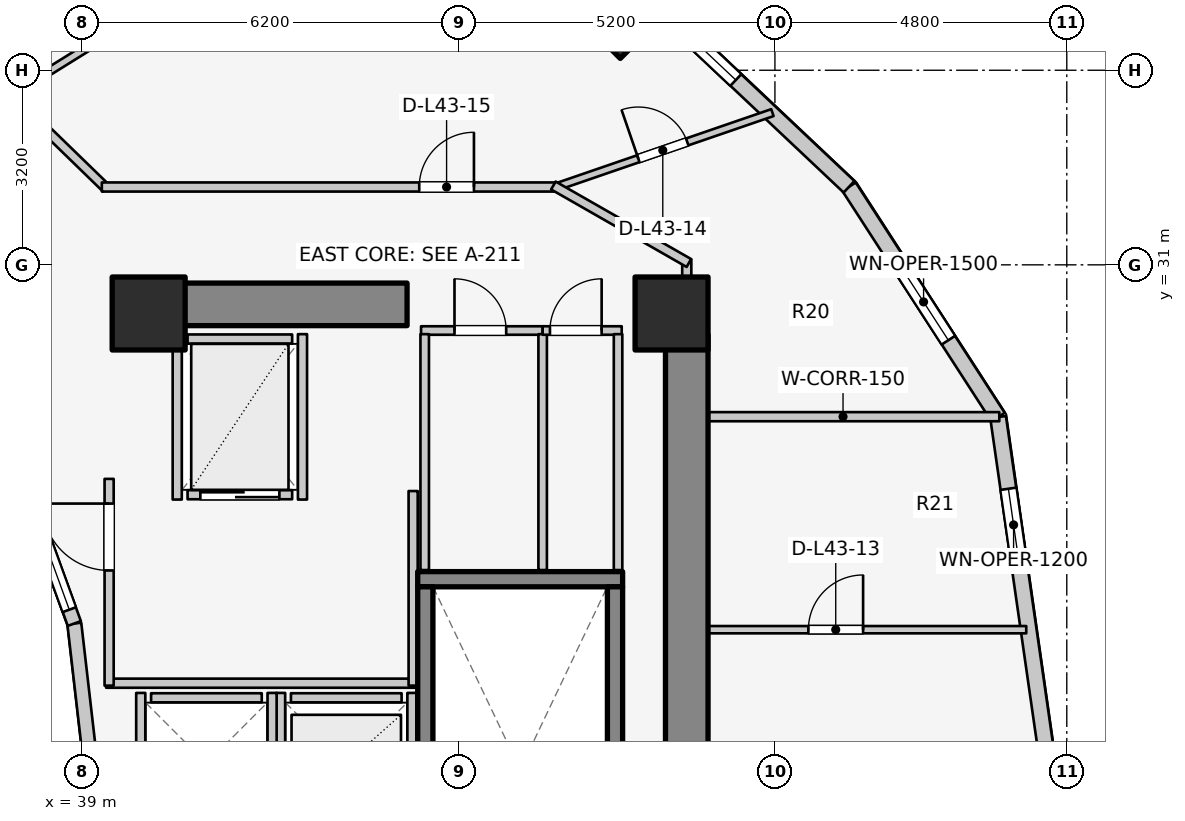
"""IFC4 building model, lengths in metres.
Left out: names, types, materials, properties, quantities, classifications, styles, units other than length and angle.
Written with IfcOpenShell. Run it as: python <this file> out.ifc"""

import sys

from ifc_helpers import new_model, si_unit, direction, frame, frame_2d, origin, origin_2d, place, context, subcontext, project, spatial, rectangle, extrude, element, fill, save


model = new_model("IFC4")
c1 = context("Model", 3, precision=1e-05, world=origin(), true_north=direction((0.0, 1.0)))
c2 = subcontext(c1, "Body", "Model", "MODEL_VIEW")
j1 = project(units=[si_unit("LENGTHUNIT", "METRE"), si_unit("PLANEANGLEUNIT", "RADIAN")], contexts=[c1])
p1 = place(None, origin())
s1 = spatial("IfcSite", under=j1, at=p1, CompositionType="ELEMENT")
p2 = place(p1, origin())
s2 = spatial("IfcBuilding", under=s1, at=p2, CompositionType="ELEMENT")
p3 = place(p2, frame((0.0, 0.0, 143.6)))
s3 = spatial("IfcBuildingStorey", under=s2, at=p3, CompositionType="ELEMENT", Elevation=143.6)
p4 = place(p3, frame((48.95, 17.05, 0.0), z_axis=(0.0, 0.0, 1.0), x_axis=(0.0, 1.0, 0.0)))
e1 = element("IfcWall", 1, at=p4, inside=s3, PredefinedType="SHEAR", context=c2, shape_type="SweptSolid", body=[
    extrude(rectangle(XDim=12.8, YDim=0.7, at=frame_2d((6.4, 0.0))), origin(), (0.0, 0.0, 1.0), 3.1),
])
p5 = place(p3, frame((39.85, 30.35, 0.0), z_axis=(0.0, 0.0, 1.0), x_axis=(1.0, 0.0, 0.0)))
e2 = element("IfcWall", 2, at=p5, inside=s3, PredefinedType="SHEAR", context=c2, shape_type="SweptSolid", body=[
    extrude(rectangle(XDim=4.5, YDim=0.7, at=frame_2d((2.25, 0.0))), origin(), (0.0, 0.0, 1.0), 3.1),
])
p6 = place(p3, frame((44.525, 25.83, 0.0), z_axis=(0.0, 0.0, 1.0), x_axis=(1.0, 0.0, 0.0)))
e3 = element("IfcWall", 3, at=p6, inside=s3, PredefinedType="SOLIDWALL", context=c2, shape_type="SweptSolid", body=[
    extrude(rectangle(XDim=3.37, YDim=0.25, at=frame_2d((1.685, 0.0))), origin(), (0.0, 0.0, 1.0), 3.1),
])
for number, where, z_axis, x_axis in (
    (4, (44.65, 17.895, 0.0), (0.0, 0.0, 1.0), (0.0, 1.0, 0.0)),
    (5, (47.77, 17.895, 0.0), (0.0, 0.0, 1.0), (0.0, 1.0, 0.0)),
):
    element("IfcWall", number, at=place(p3, frame(where, z_axis=z_axis, x_axis=x_axis)), inside=s3, PredefinedType="SOLIDWALL", context=c2, shape_type="SweptSolid", body=[
        extrude(rectangle(XDim=7.81, YDim=0.25, at=frame_2d((3.905, 0.0))), origin(), (0.0, 0.0, 1.0), 3.1),
    ])
for number, where, z_axis, x_axis in (
    (6, (48.7, 30.2, 0.0), (0.0, 0.0, 1.0), (1.0, 0.0, 0.0)),
    (7, (40.1, 30.2, 0.0), (0.0, 0.0, 1.0), (1.0, 0.0, 0.0)),
):
    element("IfcColumn", number, at=place(p3, frame(where, z_axis=z_axis, x_axis=x_axis)), inside=s3, PredefinedType="COLUMN", context=c2, shape_type="SweptSolid", body=[
        extrude(rectangle(XDim=1.2, YDim=1.2, at=origin_2d()), origin(), (0.0, 0.0, 1.0), 3.1),
    ])
p7 = place(p3, frame((47.857, 35.031, 0.0), z_axis=(0.0, 0.0, 1.0), x_axis=(0.707106781187, 0.707106781187, 0.0)))
e8 = element("IfcColumn", 8, at=p7, inside=s3, PredefinedType="COLUMN", context=c2, shape_type="SweptSolid", body=[
    extrude(rectangle(XDim=0.9, YDim=0.9, at=origin_2d()), origin(), (0.0, 0.0, 1.0), 3.1),
])
p8 = place(p3, frame((39.12, 23.0, 0.0), z_axis=(0.0, 0.0, 1.0), x_axis=(-0.114711713601, 0.993398823617, 0.0)))
e9 = element("IfcWall", 9, at=p8, inside=s3, PredefinedType="STANDARD", context=c2, shape_type="SweptSolid", body=[
    extrude(rectangle(XDim=2.115, YDim=0.23, at=frame_2d((1.058, 0.0))), origin(), (0.0, 0.0, 1.0), 2.84),
])
p9 = place(p3, frame((38.877, 25.102, 0.0), z_axis=(0.0, 0.0, 1.0), x_axis=(-0.341423187295, 0.93990968033, 0.0)))
e10 = element("IfcWall", 10, at=p9, inside=s3, PredefinedType="STANDARD", context=c2, shape_type="SweptSolid", body=[
    extrude(rectangle(XDim=2.084, YDim=0.23, at=frame_2d((1.042, 0.0))), origin(), (0.0, 0.0, 1.0), 2.84),
])
p10 = place(p9, frame((0.242, 0.0, 0.85)))
e11 = element("IfcOpeningElement", 11, at=p10, cuts=e10, PredefinedType="OPENING", context=c2, shape_type="SweptSolid", body=[
    extrude(rectangle(XDim=1.6, YDim=1.65, at=frame_2d((0.8, 0.825))), frame((0.0, 0.125, 0.0), z_axis=(0.0, -1.0, 0.0), x_axis=(1.0, 0.0, 0.0)), (0.0, 0.0, 1.0), 0.25),
])
p11 = place(p3, frame((54.86, 23.0, 0.0), z_axis=(0.0, 0.0, 1.0), x_axis=(-0.142227632286, 0.989833976288, 0.0)))
e12 = element("IfcWall", 12, at=p11, inside=s3, PredefinedType="STANDARD", context=c2, shape_type="SweptSolid", body=[
    extrude(rectangle(XDim=5.553, YDim=0.26, at=frame_2d((2.776, 0.0))), origin(), (0.0, 0.0, 1.0), 2.85),
])
p12 = place(p11, frame((3.162, 0.0, 0.75)))
e13 = element("IfcOpeningElement", 13, at=p12, cuts=e12, PredefinedType="OPENING", context=c2, shape_type="SweptSolid", body=[
    extrude(rectangle(XDim=1.2, YDim=1.5, at=frame_2d((0.6, 0.75))), frame((0.0, 0.14, 0.0), z_axis=(0.0, -1.0, 0.0), x_axis=(1.0, 0.0, 0.0)), (0.0, 0.0, 1.0), 0.28),
])
p13 = place(p3, frame((54.07, 28.497, 0.0), z_axis=(0.0, 0.0, 1.0), x_axis=(-0.543358984534, 0.839500454989, 0.0)))
e14 = element("IfcWall", 14, at=p13, inside=s3, PredefinedType="STANDARD", context=c2, shape_type="SweptSolid", body=[
    extrude(rectangle(XDim=4.511, YDim=0.26, at=frame_2d((2.256, 0.0))), origin(), (0.0, 0.0, 1.0), 2.85),
])
p14 = place(p13, frame((1.506, 0.0, 0.75)))
e15 = element("IfcOpeningElement", 15, at=p14, cuts=e14, PredefinedType="OPENING", context=c2, shape_type="SweptSolid", body=[
    extrude(rectangle(XDim=1.5, YDim=1.6, at=frame_2d((0.75, 0.8))), frame((0.0, 0.14, 0.0), z_axis=(0.0, -1.0, 0.0), x_axis=(1.0, 0.0, 0.0)), (0.0, 0.0, 1.0), 0.28),
])
p15 = place(p3, frame((51.619, 32.284, 0.0), z_axis=(0.0, 0.0, 1.0), x_axis=(-0.727667301037, 0.68593024354, 0.0)))
e16 = element("IfcWall", 16, at=p15, inside=s3, PredefinedType="STANDARD", context=c2, shape_type="SweptSolid", body=[
    extrude(rectangle(XDim=4.604, YDim=0.26, at=frame_2d((2.302, 0.0))), origin(), (0.0, 0.0, 1.0), 2.85),
])
p16 = place(p15, frame((2.56, 0.0, 0.75)))
e17 = element("IfcOpeningElement", 17, at=p16, cuts=e16, PredefinedType="OPENING", context=c2, shape_type="SweptSolid", body=[
    extrude(rectangle(XDim=1.2, YDim=1.5, at=frame_2d((0.6, 0.75))), frame((0.0, 0.14, 0.0), z_axis=(0.0, -1.0, 0.0), x_axis=(1.0, 0.0, 0.0)), (0.0, 0.0, 1.0), 0.28),
])
p17 = place(p3, frame((42.44, 23.88, 0.0), z_axis=(0.0, 0.0, 1.0), x_axis=(1.0, 0.0, 0.0)))
e18 = element("IfcWall", 18, at=p17, inside=s3, PredefinedType="SOLIDWALL", context=c2, shape_type="SweptSolid", body=[
    extrude(rectangle(XDim=1.82, YDim=0.15, at=frame_2d((0.91, 0.0))), origin(), (0.0, 0.0, 1.0), 2.855),
])
for number, where, z_axis, x_axis in (
    (19, (42.27, 21.64, 0.0), (0.0, 0.0, 1.0), (0.0, 1.0, 0.0)),
    (20, (44.43, 21.64, 0.0), (0.0, 0.0, 1.0), (0.0, 1.0, 0.0)),
):
    element("IfcWall", number, at=place(p3, frame(where, z_axis=z_axis, x_axis=x_axis)), inside=s3, PredefinedType="SOLIDWALL", context=c2, shape_type="SweptSolid", body=[
        extrude(rectangle(XDim=2.32, YDim=0.15, at=frame_2d((1.16, 0.0))), origin(), (0.0, 0.0, 1.0), 2.855),
    ])
p18 = place(p3, frame((40.14, 23.88, 0.0), z_axis=(0.0, 0.0, 1.0), x_axis=(1.0, 0.0, 0.0)))
e21 = element("IfcWall", 21, at=p18, inside=s3, PredefinedType="SOLIDWALL", context=c2, shape_type="SweptSolid", body=[
    extrude(rectangle(XDim=1.82, YDim=0.15, at=frame_2d((0.91, 0.0))), origin(), (0.0, 0.0, 1.0), 2.12),
])
p19 = place(p3, frame((39.97, 21.64, 0.0), z_axis=(0.0, 0.0, 1.0), x_axis=(0.0, 1.0, 0.0)))
e22 = element("IfcWall", 22, at=p19, inside=s3, PredefinedType="SOLIDWALL", context=c2, shape_type="SweptSolid", body=[
    extrude(rectangle(XDim=2.32, YDim=0.15, at=frame_2d((1.16, 0.0))), origin(), (0.0, 0.0, 1.0), 2.12),
])
p20 = place(p3, frame((42.13, 21.64, 0.0), z_axis=(0.0, 0.0, 1.0), x_axis=(0.0, 1.0, 0.0)))
e23 = element("IfcWall", 23, at=p20, inside=s3, PredefinedType="SOLIDWALL", context=c2, shape_type="SweptSolid", body=[
    extrude(rectangle(XDim=2.32, YDim=0.15, at=frame_2d((1.16, 0.0))), origin(), (0.0, 0.0, 1.0), 2.855),
])
p21 = place(p3, frame((40.74, 27.22, 0.0), z_axis=(0.0, 0.0, 1.0), x_axis=(1.0, 0.0, 0.0)))
e24 = element("IfcWall", 24, at=p21, inside=s3, PredefinedType="SOLIDWALL", context=c2, shape_type="SweptSolid", body=[
    extrude(rectangle(XDim=1.72, YDim=0.15, at=frame_2d((0.86, 0.0))), origin(), (0.0, 0.0, 1.0), 2.855),
])
p22 = place(p21, frame((0.21, 0.0, 0.0)))
e25 = element("IfcOpeningElement", 25, at=p22, cuts=e24, PredefinedType="OPENING", context=c2, shape_type="SweptSolid", body=[
    extrude(rectangle(XDim=1.3, YDim=2.1, at=frame_2d((0.65, 1.05))), frame((0.0, 0.085, 0.0), z_axis=(0.0, -1.0, 0.0), x_axis=(1.0, 0.0, 0.0)), (0.0, 0.0, 1.0), 0.17),
])
p23 = place(p3, frame((40.74, 29.78, 0.0), z_axis=(0.0, 0.0, 1.0), x_axis=(1.0, 0.0, 0.0)))
e26 = element("IfcWall", 26, at=p23, inside=s3, PredefinedType="SOLIDWALL", context=c2, shape_type="SweptSolid", body=[
    extrude(rectangle(XDim=1.72, YDim=0.15, at=frame_2d((0.86, 0.0))), origin(), (0.0, 0.0, 1.0), 2.855),
])
for number, where, z_axis, x_axis in (
    (27, (40.57, 27.14, 0.0), (0.0, 0.0, 1.0), (0.0, 1.0, 0.0)),
    (28, (42.63, 27.14, 0.0), (0.0, 0.0, 1.0), (0.0, 1.0, 0.0)),
):
    element("IfcWall", number, at=place(p3, frame(where, z_axis=z_axis, x_axis=x_axis)), inside=s3, PredefinedType="SOLIDWALL", context=c2, shape_type="SweptSolid", body=[
        extrude(rectangle(XDim=2.72, YDim=0.15, at=frame_2d((1.36, 0.0))), origin(), (0.0, 0.0, 1.0), 2.855),
    ])
p24 = place(p3, frame((39.4, 24.12, 0.0), z_axis=(0.0, 0.0, 1.0), x_axis=(1.0, 0.0, 0.0)))
e29 = element("IfcWall", 29, at=p24, inside=s3, PredefinedType="PARTITIONING", context=c2, shape_type="SweptSolid", body=[
    extrude(rectangle(XDim=5.08, YDim=0.15, at=frame_2d((2.54, 0.0))), origin(), (0.0, 0.0, 1.0), 2.12),
])
p25 = place(p3, frame((44.45, 24.08, 0.0), z_axis=(0.0, 0.0, 1.0), x_axis=(0.0, 1.0, 0.0)))
e30 = element("IfcWall", 30, at=p25, inside=s3, PredefinedType="PARTITIONING", context=c2, shape_type="SweptSolid", body=[
    extrude(rectangle(XDim=3.2, YDim=0.15, at=frame_2d((1.6, 0.0))), origin(), (0.0, 0.0, 1.0), 2.855),
])
p26 = place(p3, frame((39.45, 24.08, 0.0), z_axis=(0.0, 0.0, 1.0), x_axis=(0.0, 1.0, 0.0)))
e31 = element("IfcWall", 31, at=p26, inside=s3, PredefinedType="PARTITIONING", context=c2, shape_type="SweptSolid", body=[
    extrude(rectangle(XDim=3.4, YDim=0.15, at=frame_2d((1.7, 0.0))), origin(), (0.0, 0.0, 1.0), 2.855),
])
p27 = place(p26, frame((1.894, 0.0, 0.0)))
e32 = element("IfcOpeningElement", 32, at=p27, cuts=e31, PredefinedType="OPENING", context=c2, shape_type="SweptSolid", body=[
    extrude(rectangle(XDim=1.1, YDim=2.1, at=frame_2d((0.55, 1.05))), frame((0.0, 0.085, 0.0), z_axis=(0.0, -1.0, 0.0), x_axis=(1.0, 0.0, 0.0)), (0.0, 0.0, 1.0), 0.17),
])
p28 = place(p3, frame((44.58, 29.92, 0.0), z_axis=(0.0, 0.0, 1.0), x_axis=(1.0, 0.0, 0.0)))
e33 = element("IfcWall", 33, at=p28, inside=s3, PredefinedType="PLUMBINGWALL", context=c2, shape_type="SweptSolid", body=[
    extrude(rectangle(XDim=2.0, YDim=0.14, at=frame_2d((1.0, 0.0))), origin(), (0.0, 0.0, 1.0), 2.855),
])
p29 = place(p28, frame((0.55, 0.0, 0.0)))
e34 = element("IfcOpeningElement", 34, at=p29, cuts=e33, PredefinedType="OPENING", context=c2, shape_type="SweptSolid", body=[
    extrude(rectangle(XDim=0.85, YDim=2.05, at=frame_2d((0.425, 1.025))), frame((0.0, 0.08, 0.0), z_axis=(0.0, -1.0, 0.0), x_axis=(1.0, 0.0, 0.0)), (0.0, 0.0, 1.0), 0.16),
])
for number, where, z_axis, x_axis in (
    (35, (44.64, 25.98, 0.0), (0.0, 0.0, 1.0), (0.0, 1.0, 0.0)),
    (36, (46.58, 25.98, 0.0), (0.0, 0.0, 1.0), (0.0, 1.0, 0.0)),
):
    element("IfcWall", number, at=place(p3, frame(where, z_axis=z_axis, x_axis=x_axis)), inside=s3, PredefinedType="PLUMBINGWALL", context=c2, shape_type="SweptSolid", body=[
        extrude(rectangle(XDim=3.88, YDim=0.14, at=frame_2d((1.94, 0.0))), origin(), (0.0, 0.0, 1.0), 2.855),
    ])
p30 = place(p3, frame((46.58, 29.92, 0.0), z_axis=(0.0, 0.0, 1.0), x_axis=(1.0, 0.0, 0.0)))
e37 = element("IfcWall", 37, at=p30, inside=s3, PredefinedType="PLUMBINGWALL", context=c2, shape_type="SweptSolid", body=[
    extrude(rectangle(XDim=1.3, YDim=0.14, at=frame_2d((0.65, 0.0))), origin(), (0.0, 0.0, 1.0), 2.855),
])
p31 = place(p30, frame((0.12, 0.0, 0.0)))
e38 = element("IfcOpeningElement", 38, at=p31, cuts=e37, PredefinedType="OPENING", context=c2, shape_type="SweptSolid", body=[
    extrude(rectangle(XDim=0.85, YDim=2.05, at=frame_2d((0.425, 1.025))), frame((0.0, 0.08, 0.0), z_axis=(0.0, -1.0, 0.0), x_axis=(1.0, 0.0, 0.0)), (0.0, 0.0, 1.0), 0.16),
])
p32 = place(p3, frame((47.82, 25.98, 0.0), z_axis=(0.0, 0.0, 1.0), x_axis=(0.0, 1.0, 0.0)))
e39 = element("IfcWall", 39, at=p32, inside=s3, PredefinedType="PLUMBINGWALL", context=c2, shape_type="SweptSolid", body=[
    extrude(rectangle(XDim=3.88, YDim=0.14, at=frame_2d((1.94, 0.0))), origin(), (0.0, 0.0, 1.0), 2.855),
])
p33 = place(p3, frame((48.95, 28.503, 0.0), z_axis=(0.0, 0.0, 1.0), x_axis=(1.0, 0.0, 0.0)))
e40 = element("IfcWall", 40, at=p33, inside=s3, PredefinedType="PARTITIONING", context=c2, shape_type="SweptSolid", body=[
    extrude(rectangle(XDim=5.14, YDim=0.15, at=frame_2d((2.57, 0.0))), origin(), (0.0, 0.0, 1.0), 2.855),
])
p34 = place(p3, frame((48.95, 25.0, 0.0), z_axis=(0.0, 0.0, 1.0), x_axis=(1.0, 0.0, 0.0)))
e41 = element("IfcWall", 41, at=p34, inside=s3, PredefinedType="MOVABLE", context=c2, shape_type="SweptSolid", body=[
    extrude(rectangle(XDim=5.583, YDim=0.12, at=frame_2d((2.792, 0.0))), origin(), (0.0, 0.0, 1.0), 2.855),
])
p35 = place(p34, frame((2.0, 0.0, 0.0)))
e42 = element("IfcOpeningElement", 42, at=p35, cuts=e41, PredefinedType="OPENING", context=c2, shape_type="SweptSolid", body=[
    extrude(rectangle(XDim=0.9, YDim=2.1, at=frame_2d((0.45, 1.05))), frame((0.0, 0.07, 0.0), z_axis=(0.0, -1.0, 0.0), x_axis=(1.0, 0.0, 0.0)), (0.0, 0.0, 1.0), 0.14),
])
p36 = place(p3, frame((48.95, 29.8, 0.0), z_axis=(0.0, 0.0, 1.0), x_axis=(0.0, 1.0, 0.0)))
e43 = element("IfcWall", 43, at=p36, inside=s3, PredefinedType="PARTITIONING", context=c2, shape_type="SweptSolid", body=[
    extrude(rectangle(XDim=1.29, YDim=0.15, at=frame_2d((0.645, 0.0))), origin(), (0.0, 0.0, 1.0), 2.855),
])
p37 = place(p3, frame((46.753, 32.264, 0.0), z_axis=(0.0, 0.0, 1.0), x_axis=(0.945683523506, 0.325088716151, 0.0)))
e44 = element("IfcWall", 44, at=p37, inside=s3, PredefinedType="MOVABLE", context=c2, shape_type="SweptSolid", body=[
    extrude(rectangle(XDim=3.813, YDim=0.12, at=frame_2d((1.906, 0.0))), origin(), (0.0, 0.0, 1.0), 2.22),
])
p38 = place(p37, frame((1.481, 0.0, 0.0)))
e45 = element("IfcOpeningElement", 45, at=p38, cuts=e44, PredefinedType="OPENING", context=c2, shape_type="SweptSolid", body=[
    extrude(rectangle(XDim=0.85, YDim=2.05, at=frame_2d((0.425, 1.025))), frame((0.0, 0.07, 0.0), z_axis=(0.0, -1.0, 0.0), x_axis=(1.0, 0.0, 0.0)), (0.0, 0.0, 1.0), 0.14),
])
p39 = place(p3, frame((37.867, 33.749, 0.0), z_axis=(0.0, 0.0, 1.0), x_axis=(0.717419568599, -0.696641344302, 0.0)))
e46 = element("IfcWall", 46, at=p39, inside=s3, PredefinedType="PARTITIONING", context=c2, shape_type="SweptSolid", body=[
    extrude(rectangle(XDim=2.138, YDim=0.15, at=frame_2d((1.069, 0.0))), origin(), (0.0, 0.0, 1.0), 2.299),
])
p40 = place(p3, frame((39.33, 32.28, 0.0), z_axis=(0.0, 0.0, 1.0), x_axis=(1.0, 0.0, 0.0)))
e47 = element("IfcWall", 47, at=p40, inside=s3, PredefinedType="PARTITIONING", context=c2, shape_type="SweptSolid", body=[
    extrude(rectangle(XDim=7.52, YDim=0.15, at=frame_2d((3.76, 0.0))), origin(), (0.0, 0.0, 1.0), 2.299),
])
p41 = place(p40, frame((5.22, 0.0, 0.0)))
e48 = element("IfcOpeningElement", 48, at=p41, cuts=e47, PredefinedType="OPENING", context=c2, shape_type="SweptSolid", body=[
    extrude(rectangle(XDim=0.9, YDim=2.1, at=frame_2d((0.45, 1.05))), frame((0.0, 0.085, 0.0), z_axis=(0.0, -1.0, 0.0), x_axis=(1.0, 0.0, 0.0)), (0.0, 0.0, 1.0), 0.17),
])
p42 = place(p3, frame((46.757, 32.305, 0.0), z_axis=(0.0, 0.0, 1.0), x_axis=(0.867991349648, -0.496579315857, 0.0)))
e49 = element("IfcWall", 49, at=p42, inside=s3, PredefinedType="PARTITIONING", context=c2, shape_type="SweptSolid", body=[
    extrude(rectangle(XDim=2.567, YDim=0.15, at=frame_2d((1.283, 0.0))), origin(), (0.0, 0.0, 1.0), 2.22),
])
p43 = place(p3, frame((37.875, 33.816, 0.0), z_axis=(0.0, 0.0, 1.0), x_axis=(0.849008457073, 0.528379257559, 0.0)))
e50 = element("IfcWall", 50, at=p43, inside=s3, PredefinedType="PARTITIONING", context=c2, shape_type="SweptSolid", body=[
    extrude(rectangle(XDim=7.077, YDim=0.125, at=frame_2d((3.539, 0.0))), origin(), (0.0, 0.0, 1.0), 2.299),
])
p44 = place(p10, origin())
e51 = element("IfcWindow", 51, at=p44, inside=s3, PartitioningType="SINGLE_PANEL", PredefinedType="WINDOW", context=c2, shape_type="SweptSolid", body=[
    extrude(rectangle(XDim=1.6, YDim=1.65, at=frame_2d((0.8, 0.825))), frame((0.0, 0.03, 0.0), z_axis=(0.0, -1.0, 0.0), x_axis=(1.0, 0.0, 0.0)), (0.0, 0.0, 1.0), 0.06),
])
fill(e11, e51)
p45 = place(p12, origin())
e52 = element("IfcWindow", 52, at=p45, inside=s3, PartitioningType="SINGLE_PANEL", PredefinedType="WINDOW", context=c2, shape_type="SweptSolid", body=[
    extrude(rectangle(XDim=1.2, YDim=1.5, at=frame_2d((0.6, 0.75))), frame((0.0, 0.03, 0.0), z_axis=(0.0, -1.0, 0.0), x_axis=(1.0, 0.0, 0.0)), (0.0, 0.0, 1.0), 0.06),
])
fill(e13, e52)
p46 = place(p14, origin())
e53 = element("IfcWindow", 53, at=p46, inside=s3, PartitioningType="SINGLE_PANEL", PredefinedType="WINDOW", context=c2, shape_type="SweptSolid", body=[
    extrude(rectangle(XDim=1.5, YDim=1.6, at=frame_2d((0.75, 0.8))), frame((0.0, 0.03, 0.0), z_axis=(0.0, -1.0, 0.0), x_axis=(1.0, 0.0, 0.0)), (0.0, 0.0, 1.0), 0.06),
])
fill(e15, e53)
p47 = place(p16, origin())
e54 = element("IfcWindow", 54, at=p47, inside=s3, PartitioningType="SINGLE_PANEL", PredefinedType="WINDOW", context=c2, shape_type="SweptSolid", body=[
    extrude(rectangle(XDim=1.2, YDim=1.5, at=frame_2d((0.6, 0.75))), frame((0.0, 0.03, 0.0), z_axis=(0.0, -1.0, 0.0), x_axis=(1.0, 0.0, 0.0)), (0.0, 0.0, 1.0), 0.06),
])
fill(e17, e54)
p48 = place(p22, origin())
e55 = element("IfcDoor", 55, at=p48, inside=s3, OperationType="DOUBLE_DOOR_SLIDING", PredefinedType="DOOR", context=c2, shape_type="SweptSolid", body=[
    extrude(rectangle(XDim=1.3, YDim=2.1, at=frame_2d((0.65, 1.05))), frame((0.0, 0.025, 0.0), z_axis=(0.0, -1.0, 0.0), x_axis=(1.0, 0.0, 0.0)), (0.0, 0.0, 1.0), 0.05),
])
fill(e25, e55)
p49 = place(p27, origin())
e56 = element("IfcDoor", 56, at=p49, inside=s3, OperationType="SINGLE_SWING_RIGHT", PredefinedType="DOOR", context=c2, shape_type="SweptSolid", body=[
    extrude(rectangle(XDim=1.1, YDim=2.1, at=frame_2d((0.55, 1.05))), frame((0.0, 0.025, 0.0), z_axis=(0.0, -1.0, 0.0), x_axis=(1.0, 0.0, 0.0)), (0.0, 0.0, 1.0), 0.05),
])
fill(e32, e56)
p50 = place(p29, origin())
e57 = element("IfcDoor", 57, at=p50, inside=s3, OperationType="SINGLE_SWING_LEFT", PredefinedType="DOOR", context=c2, shape_type="SweptSolid", body=[
    extrude(rectangle(XDim=0.85, YDim=2.05, at=frame_2d((0.425, 1.025))), frame((0.0, 0.025, 0.0), z_axis=(0.0, -1.0, 0.0), x_axis=(1.0, 0.0, 0.0)), (0.0, 0.0, 1.0), 0.05),
])
fill(e34, e57)
p51 = place(p31, origin())
e58 = element("IfcDoor", 58, at=p51, inside=s3, OperationType="SINGLE_SWING_RIGHT", PredefinedType="DOOR", context=c2, shape_type="SweptSolid", body=[
    extrude(rectangle(XDim=0.85, YDim=2.05, at=frame_2d((0.425, 1.025))), frame((0.0, 0.025, 0.0), z_axis=(0.0, -1.0, 0.0), x_axis=(1.0, 0.0, 0.0)), (0.0, 0.0, 1.0), 0.05),
])
fill(e38, e58)
p52 = place(p35, origin())
e59 = element("IfcDoor", 59, at=p52, inside=s3, OperationType="SINGLE_SWING_RIGHT", PredefinedType="DOOR", context=c2, shape_type="SweptSolid", body=[
    extrude(rectangle(XDim=0.9, YDim=2.1, at=frame_2d((0.45, 1.05))), frame((0.0, 0.025, 0.0), z_axis=(0.0, -1.0, 0.0), x_axis=(1.0, 0.0, 0.0)), (0.0, 0.0, 1.0), 0.05),
])
fill(e42, e59)
p53 = place(p38, origin())
e60 = element("IfcDoor", 60, at=p53, inside=s3, OperationType="SINGLE_SWING_LEFT", PredefinedType="DOOR", context=c2, shape_type="SweptSolid", body=[
    extrude(rectangle(XDim=0.85, YDim=2.05, at=frame_2d((0.425, 1.025))), frame((0.0, 0.025, 0.0), z_axis=(0.0, -1.0, 0.0), x_axis=(1.0, 0.0, 0.0)), (0.0, 0.0, 1.0), 0.05),
])
fill(e45, e60)
p54 = place(p41, origin())
e61 = element("IfcDoor", 61, at=p54, inside=s3, OperationType="SINGLE_SWING_RIGHT", PredefinedType="DOOR", context=c2, shape_type="SweptSolid", body=[
    extrude(rectangle(XDim=0.9, YDim=2.1, at=frame_2d((0.45, 1.05))), frame((0.0, 0.025, 0.0), z_axis=(0.0, -1.0, 0.0), x_axis=(1.0, 0.0, 0.0)), (0.0, 0.0, 1.0), 0.05),
])
fill(e48, e61)
save(model, sys.argv[1])
